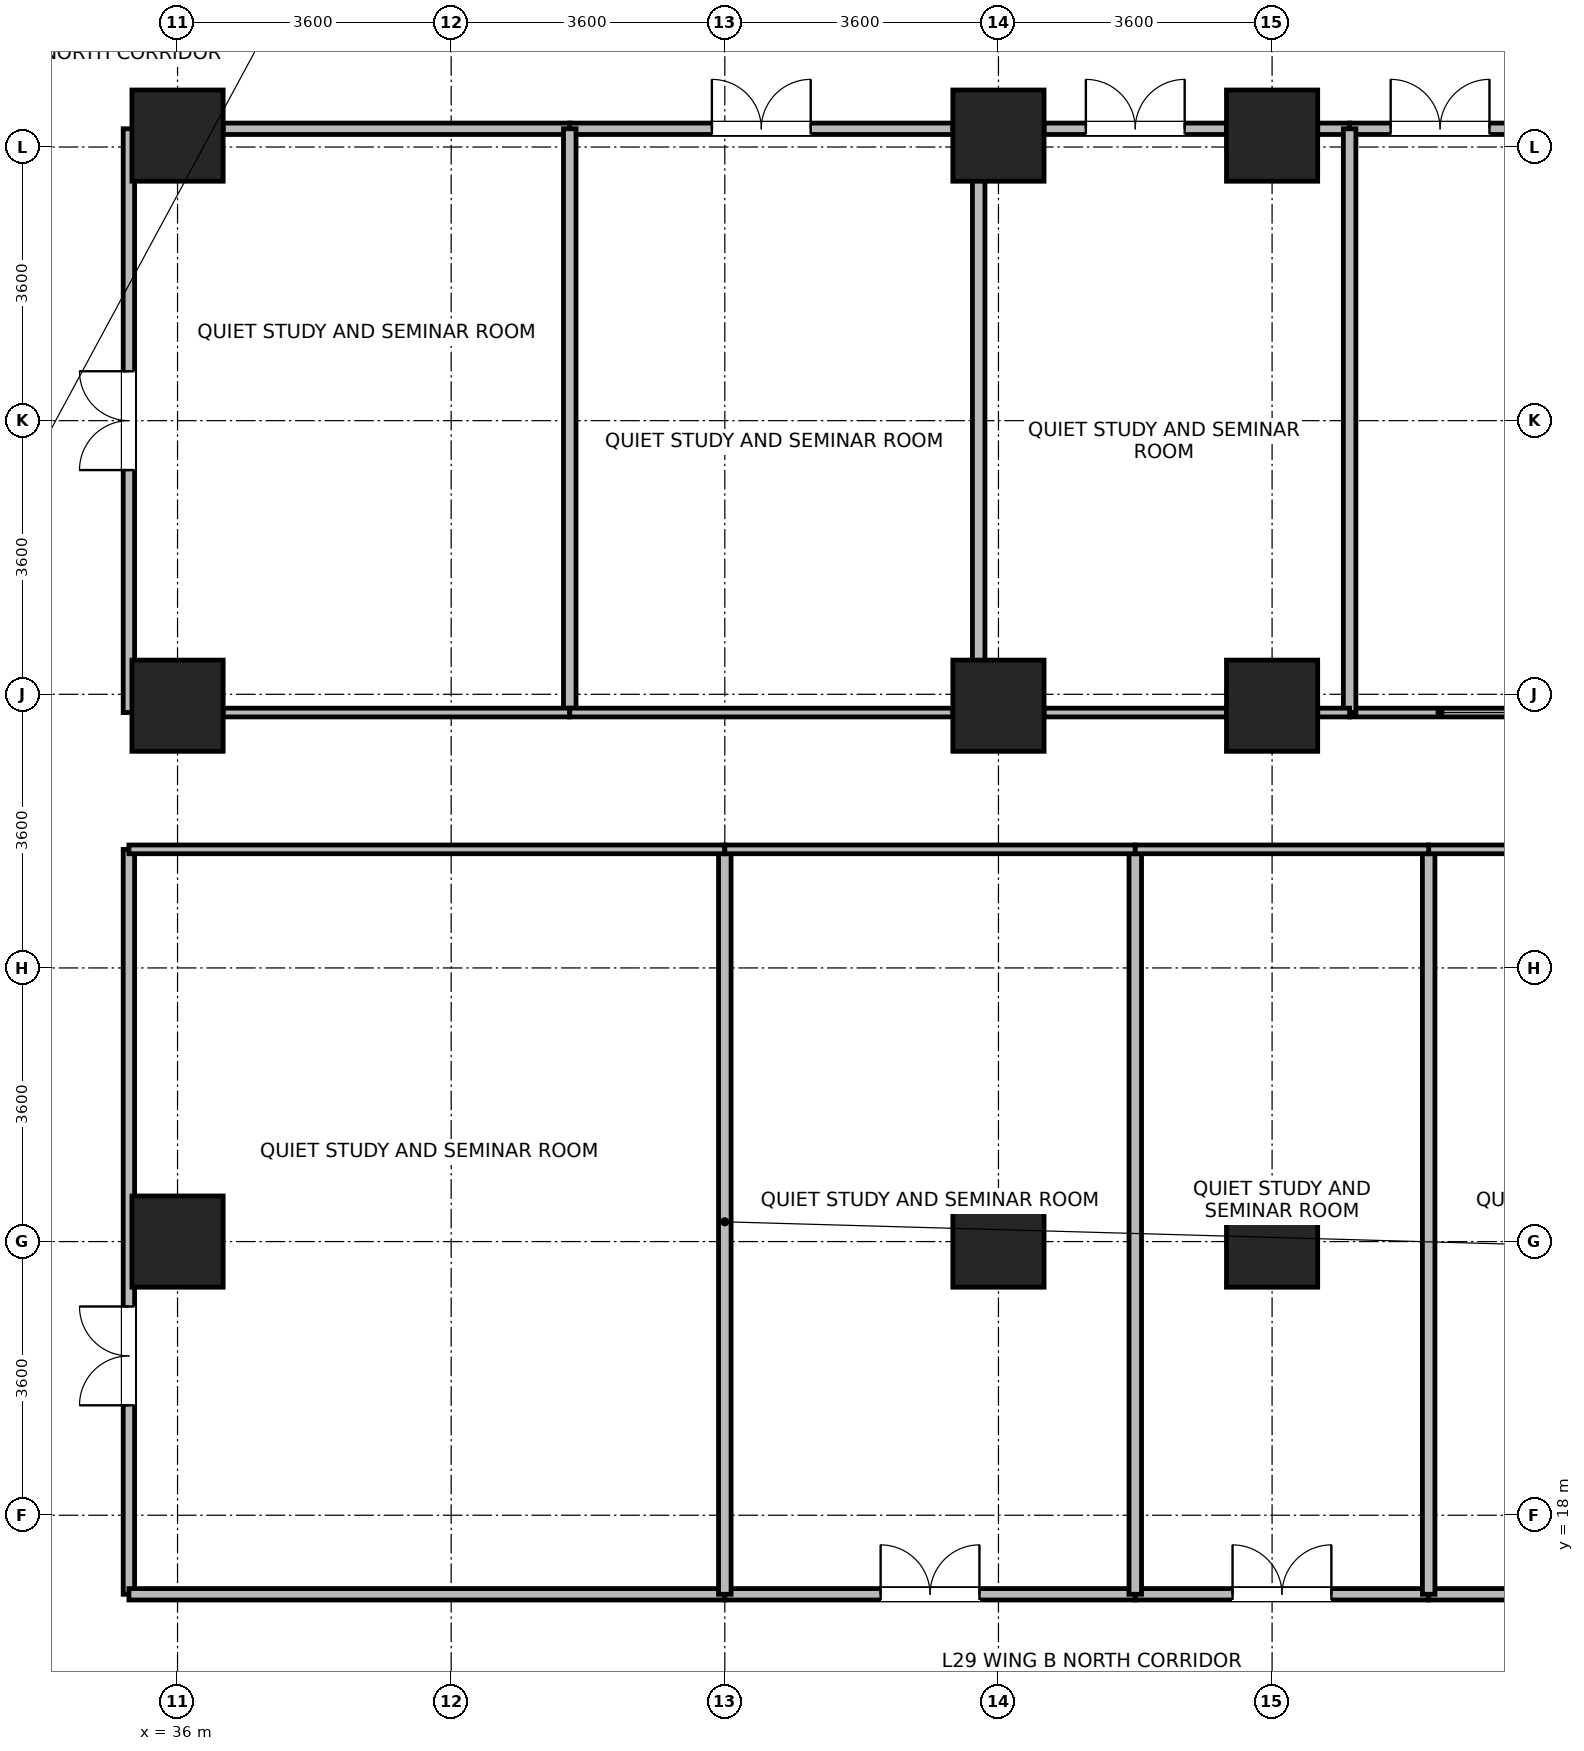
"""IFC4 building model, lengths in metres.
Left out: names, types, materials, properties, quantities, classifications, styles, units other than length and angle.
Written with IfcOpenShell. Run it as: python <this file> out.ifc"""

import sys

from ifc_helpers import new_model, si_unit, direction, frame, frame_2d, origin, origin_2d, place, context, subcontext, project, spatial, rectangle, extrude, source, transform, mapped, element, fill, save


model = new_model("IFC4")
c1 = context("Model", 3, precision=1e-05, world=origin(), true_north=direction((0.0, 1.0)))
c2 = subcontext(c1, "Body", "Model", "MODEL_VIEW")
j1 = project(units=[si_unit("LENGTHUNIT", "METRE"), si_unit("PLANEANGLEUNIT", "RADIAN")], contexts=[c1])
p1 = place(None, origin())
s1 = spatial("IfcSite", under=j1, at=p1, CompositionType="ELEMENT")
p2 = place(p1, origin())
s2 = spatial("IfcBuilding", under=s1, at=p2, CompositionType="ELEMENT")
p3 = place(p2, frame((0.0, 0.0, 115.6)))
s3 = spatial("IfcBuildingStorey", under=s2, at=p3, CompositionType="ELEMENT", Elevation=115.6)
m1 = source(origin(), c2, "Body", "SweptSolid", [
    extrude(rectangle(XDim=1.2, YDim=1.2, at=origin_2d()), origin(), (0.0, 0.0, 1.0), 3.7),
])
for number, where, z_axis, x_axis in (
    (1, (36.0, 21.6, 0.0), (0.0, 0.0, 1.0), (1.0, 0.0, 0.0)),
    (2, (36.0, 28.65, 0.0), (0.0, 0.0, 1.0), (1.0, 0.0, 0.0)),
    (3, (36.0, 36.15, 0.0), (0.0, 0.0, 1.0), (1.0, 0.0, 0.0)),
    (4, (46.8, 21.6, 0.0), (0.0, 0.0, 1.0), (1.0, 0.0, 0.0)),
    (5, (46.8, 28.65, 0.0), (0.0, 0.0, 1.0), (1.0, 0.0, 0.0)),
    (6, (46.8, 36.15, 0.0), (0.0, 0.0, 1.0), (1.0, 0.0, 0.0)),
    (7, (50.4, 21.6, 0.0), (0.0, 0.0, 1.0), (1.0, 0.0, 0.0)),
    (8, (50.4, 28.65, 0.0), (0.0, 0.0, 1.0), (1.0, 0.0, 0.0)),
    (9, (50.4, 36.15, 0.0), (0.0, 0.0, 1.0), (1.0, 0.0, 0.0)),
):
    element("IfcColumn", number, at=place(p3, frame(where, z_axis=z_axis, x_axis=x_axis)), inside=s3, PredefinedType="COLUMN", context=c2, shape_type="MappedRepresentation", body=[
        mapped(m1, transform((0.0, 0.0, 0.0), x_axis=(1.0, 0.0, 0.0), y_axis=(0.0, 1.0, 0.0), z_axis=(0.0, 0.0, 1.0), scale=1.0)),
    ])
p4 = place(p3, frame((35.36, 16.96, 0.0), z_axis=(0.0, 0.0, 1.0), x_axis=(0.0, 1.0, 0.0)))
e10 = element("IfcWall", 10, at=p4, inside=s3, PredefinedType="PARTITIONING", context=c2, shape_type="SweptSolid", body=[
    extrude(rectangle(XDim=9.8, YDim=0.15, at=frame_2d((4.9, 0.0))), origin(), (0.0, 0.0, 1.0), 3.43),
])
p5 = place(p4, frame((2.486, 0.0, 0.0)))
e11 = element("IfcOpeningElement", 11, at=p5, cuts=e10, PredefinedType="OPENING", context=c2, shape_type="SweptSolid", body=[
    extrude(rectangle(XDim=1.3, YDim=2.12, at=frame_2d((0.65, 1.06))), frame((0.0, 0.085, 0.0), z_axis=(0.0, -1.0, 0.0), x_axis=(1.0, 0.0, 0.0)), (0.0, 0.0, 1.0), 0.17),
])
p6 = place(p3, frame((51.42, 36.24, 0.0), z_axis=(0.0, 0.0, 1.0), x_axis=(1.0, 0.0, 0.0)))
e12 = element("IfcWall", 12, at=p6, inside=s3, PredefinedType="PARTITIONING", context=c2, shape_type="SweptSolid", body=[
    extrude(rectangle(XDim=2.38, YDim=0.15, at=frame_2d((1.19, 0.0))), origin(), (0.0, 0.0, 1.0), 2.78),
])
p7 = place(p6, frame((0.54, 0.0, 0.0)))
e13 = element("IfcOpeningElement", 13, at=p7, cuts=e12, PredefinedType="OPENING", context=c2, shape_type="SweptSolid", body=[
    extrude(rectangle(XDim=1.3, YDim=2.12, at=frame_2d((0.65, 1.06))), frame((0.0, 0.085, 0.0), z_axis=(0.0, -1.0, 0.0), x_axis=(1.0, 0.0, 0.0)), (0.0, 0.0, 1.0), 0.17),
])
p8 = place(p3, frame((35.36, 16.96, 0.0), z_axis=(0.0, 0.0, 1.0), x_axis=(1.0, 0.0, 0.0)))
e14 = element("IfcWall", 14, at=p8, inside=s3, PredefinedType="PARTITIONING", context=c2, shape_type="SweptSolid", body=[
    extrude(rectangle(XDim=7.84, YDim=0.15, at=frame_2d((3.92, 0.0))), origin(), (0.0, 0.0, 1.0), 3.43),
])
p9 = place(p3, frame((35.36, 28.56, 0.0), z_axis=(0.0, 0.0, 1.0), x_axis=(0.0, 1.0, 0.0)))
e15 = element("IfcWall", 15, at=p9, inside=s3, PredefinedType="PARTITIONING", context=c2, shape_type="SweptSolid", body=[
    extrude(rectangle(XDim=7.68, YDim=0.15, at=frame_2d((3.84, 0.0))), origin(), (0.0, 0.0, 1.0), 3.43),
])
p10 = place(p9, frame((3.19, 0.0, 0.0)))
e16 = element("IfcOpeningElement", 16, at=p10, cuts=e15, PredefinedType="OPENING", context=c2, shape_type="SweptSolid", body=[
    extrude(rectangle(XDim=1.3, YDim=2.12, at=frame_2d((0.65, 1.06))), frame((0.0, 0.085, 0.0), z_axis=(0.0, -1.0, 0.0), x_axis=(1.0, 0.0, 0.0)), (0.0, 0.0, 1.0), 0.17),
])
p11 = place(p3, frame((36.6, 36.24, 0.0), z_axis=(0.0, 0.0, 1.0), x_axis=(1.0, 0.0, 0.0)))
e17 = element("IfcWall", 17, at=p11, inside=s3, PredefinedType="PARTITIONING", context=c2, shape_type="SweptSolid", body=[
    extrude(rectangle(XDim=4.56, YDim=0.15, at=frame_2d((2.28, 0.0))), origin(), (0.0, 0.0, 1.0), 2.78),
])
p12 = place(p3, frame((52.46, 16.96, 0.0), z_axis=(0.0, 0.0, 1.0), x_axis=(1.0, 0.0, 0.0)))
e18 = element("IfcWall", 18, at=p12, inside=s3, PredefinedType="PARTITIONING", context=c2, shape_type="SweptSolid", body=[
    extrude(rectangle(XDim=5.7, YDim=0.15, at=frame_2d((2.85, 0.0))), origin(), (0.0, 0.0, 1.0), 3.43),
])
p13 = place(p12, frame((2.2, 0.0, 0.0)))
e19 = element("IfcOpeningElement", 19, at=p13, cuts=e18, PredefinedType="OPENING", context=c2, shape_type="SweptSolid", body=[
    extrude(rectangle(XDim=1.3, YDim=2.12, at=frame_2d((0.65, 1.06))), frame((0.0, 0.085, 0.0), z_axis=(0.0, -1.0, 0.0), x_axis=(1.0, 0.0, 0.0)), (0.0, 0.0, 1.0), 0.17),
])
p14 = place(p3, frame((43.2, 16.96, 0.0), z_axis=(0.0, 0.0, 1.0), x_axis=(1.0, 0.0, 0.0)))
e20 = element("IfcWall", 20, at=p14, inside=s3, PredefinedType="PARTITIONING", context=c2, shape_type="SweptSolid", body=[
    extrude(rectangle(XDim=5.4, YDim=0.15, at=frame_2d((2.7, 0.0))), origin(), (0.0, 0.0, 1.0), 3.43),
])
p15 = place(p14, frame((2.05, 0.0, 0.0)))
e21 = element("IfcOpeningElement", 21, at=p15, cuts=e20, PredefinedType="OPENING", context=c2, shape_type="SweptSolid", body=[
    extrude(rectangle(XDim=1.3, YDim=2.12, at=frame_2d((0.65, 1.06))), frame((0.0, 0.085, 0.0), z_axis=(0.0, -1.0, 0.0), x_axis=(1.0, 0.0, 0.0)), (0.0, 0.0, 1.0), 0.17),
])
p16 = place(p3, frame((41.16, 36.24, 0.0), z_axis=(0.0, 0.0, 1.0), x_axis=(1.0, 0.0, 0.0)))
e22 = element("IfcWall", 22, at=p16, inside=s3, PredefinedType="PARTITIONING", context=c2, shape_type="SweptSolid", body=[
    extrude(rectangle(XDim=5.04, YDim=0.15, at=frame_2d((2.52, 0.0))), origin(), (0.0, 0.0, 1.0), 2.78),
])
p17 = place(p16, frame((1.87, 0.0, 0.0)))
e23 = element("IfcOpeningElement", 23, at=p17, cuts=e22, PredefinedType="OPENING", context=c2, shape_type="SweptSolid", body=[
    extrude(rectangle(XDim=1.3, YDim=2.12, at=frame_2d((0.65, 1.06))), frame((0.0, 0.085, 0.0), z_axis=(0.0, -1.0, 0.0), x_axis=(1.0, 0.0, 0.0)), (0.0, 0.0, 1.0), 0.17),
])
p18 = place(p3, frame((47.4, 36.24, 0.0), z_axis=(0.0, 0.0, 1.0), x_axis=(1.0, 0.0, 0.0)))
e24 = element("IfcWall", 24, at=p18, inside=s3, PredefinedType="PARTITIONING", context=c2, shape_type="SweptSolid", body=[
    extrude(rectangle(XDim=2.4, YDim=0.15, at=frame_2d((1.2, 0.0))), origin(), (0.0, 0.0, 1.0), 2.78),
])
p19 = place(p18, frame((0.55, 0.0, 0.0)))
e25 = element("IfcOpeningElement", 25, at=p19, cuts=e24, PredefinedType="OPENING", context=c2, shape_type="SweptSolid", body=[
    extrude(rectangle(XDim=1.3, YDim=2.12, at=frame_2d((0.65, 1.06))), frame((0.0, 0.085, 0.0), z_axis=(0.0, -1.0, 0.0), x_axis=(1.0, 0.0, 0.0)), (0.0, 0.0, 1.0), 0.17),
])
p20 = place(p3, frame((51.0, 36.24, 0.0), z_axis=(0.0, 0.0, 1.0), x_axis=(1.0, 0.0, 0.0)))
e26 = element("IfcWall", 26, at=p20, inside=s3, PredefinedType="PARTITIONING", context=c2, shape_type="SweptSolid", body=[
    extrude(rectangle(XDim=0.42, YDim=0.15, at=frame_2d((0.21, 0.0))), origin(), (0.0, 0.0, 1.0), 2.78),
])
p21 = place(p3, frame((48.6, 16.96, 0.0), z_axis=(0.0, 0.0, 1.0), x_axis=(1.0, 0.0, 0.0)))
e27 = element("IfcWall", 27, at=p21, inside=s3, PredefinedType="PARTITIONING", context=c2, shape_type="SweptSolid", body=[
    extrude(rectangle(XDim=3.86, YDim=0.15, at=frame_2d((1.93, 0.0))), origin(), (0.0, 0.0, 1.0), 3.43),
])
p22 = place(p21, frame((1.28, 0.0, 0.0)))
e28 = element("IfcOpeningElement", 28, at=p22, cuts=e27, PredefinedType="OPENING", context=c2, shape_type="SweptSolid", body=[
    extrude(rectangle(XDim=1.3, YDim=2.12, at=frame_2d((0.65, 1.06))), frame((0.0, 0.085, 0.0), z_axis=(0.0, -1.0, 0.0), x_axis=(1.0, 0.0, 0.0)), (0.0, 0.0, 1.0), 0.17),
])
for number, where, z_axis, x_axis in (
    (29, (43.2, 16.96, 0.0), (0.0, 0.0, 1.0), (0.0, 1.0, 0.0)),
    (30, (48.6, 16.96, 0.0), (0.0, 0.0, 1.0), (0.0, 1.0, 0.0)),
    (31, (52.46, 16.96, 0.0), (0.0, 0.0, 1.0), (0.0, 1.0, 0.0)),
):
    element("IfcWall", number, at=place(p3, frame(where, z_axis=z_axis, x_axis=x_axis)), inside=s3, PredefinedType="PARTITIONING", context=c2, shape_type="SweptSolid", body=[
        extrude(rectangle(XDim=9.8, YDim=0.165, at=frame_2d((4.9, 0.0))), origin(), (0.0, 0.0, 1.0), 3.43),
    ])
p23 = place(p3, frame((51.42, 28.56, 0.0), z_axis=(0.0, 0.0, 1.0), x_axis=(1.0, 0.0, 0.0)))
e32 = element("IfcWall", 32, at=p23, inside=s3, PredefinedType="PARTITIONING", context=c2, shape_type="SweptSolid", body=[
    extrude(rectangle(XDim=2.38, YDim=0.115, at=frame_2d((1.19, 0.0))), origin(), (0.0, 0.0, 1.0), 2.78),
])
p24 = place(p3, frame((35.36, 26.76, 0.0), z_axis=(0.0, 0.0, 1.0), x_axis=(1.0, 0.0, 0.0)))
e33 = element("IfcWall", 33, at=p24, inside=s3, PredefinedType="PARTITIONING", context=c2, shape_type="SweptSolid", body=[
    extrude(rectangle(XDim=7.84, YDim=0.115, at=frame_2d((3.92, 0.0))), origin(), (0.0, 0.0, 1.0), 3.43),
])
for number, where, z_axis, x_axis in (
    (34, (41.16, 28.56, 0.0), (0.0, 0.0, 1.0), (0.0, 1.0, 0.0)),
    (35, (46.54, 28.56, 0.0), (0.0, 0.0, 1.0), (0.0, 1.0, 0.0)),
    (36, (51.42, 28.56, 0.0), (0.0, 0.0, 1.0), (0.0, 1.0, 0.0)),
):
    element("IfcWall", number, at=place(p3, frame(where, z_axis=z_axis, x_axis=x_axis)), inside=s3, PredefinedType="PARTITIONING", context=c2, shape_type="SweptSolid", body=[
        extrude(rectangle(XDim=7.68, YDim=0.165, at=frame_2d((3.84, 0.0))), origin(), (0.0, 0.0, 1.0), 3.43),
    ])
p25 = place(p3, frame((36.6, 28.56, 0.0), z_axis=(0.0, 0.0, 1.0), x_axis=(1.0, 0.0, 0.0)))
e37 = element("IfcWall", 37, at=p25, inside=s3, PredefinedType="PARTITIONING", context=c2, shape_type="SweptSolid", body=[
    extrude(rectangle(XDim=4.56, YDim=0.115, at=frame_2d((2.28, 0.0))), origin(), (0.0, 0.0, 1.0), 2.78),
])
p26 = place(p3, frame((52.46, 26.76, 0.0), z_axis=(0.0, 0.0, 1.0), x_axis=(1.0, 0.0, 0.0)))
e38 = element("IfcWall", 38, at=p26, inside=s3, PredefinedType="PARTITIONING", context=c2, shape_type="SweptSolid", body=[
    extrude(rectangle(XDim=5.7, YDim=0.115, at=frame_2d((2.85, 0.0))), origin(), (0.0, 0.0, 1.0), 3.43),
])
p27 = place(p3, frame((43.2, 26.76, 0.0), z_axis=(0.0, 0.0, 1.0), x_axis=(1.0, 0.0, 0.0)))
e39 = element("IfcWall", 39, at=p27, inside=s3, PredefinedType="PARTITIONING", context=c2, shape_type="SweptSolid", body=[
    extrude(rectangle(XDim=5.4, YDim=0.115, at=frame_2d((2.7, 0.0))), origin(), (0.0, 0.0, 1.0), 3.43),
])
p28 = place(p3, frame((41.16, 28.56, 0.0), z_axis=(0.0, 0.0, 1.0), x_axis=(1.0, 0.0, 0.0)))
e40 = element("IfcWall", 40, at=p28, inside=s3, PredefinedType="PARTITIONING", context=c2, shape_type="SweptSolid", body=[
    extrude(rectangle(XDim=5.04, YDim=0.115, at=frame_2d((2.52, 0.0))), origin(), (0.0, 0.0, 1.0), 2.78),
])
p29 = place(p3, frame((47.4, 28.56, 0.0), z_axis=(0.0, 0.0, 1.0), x_axis=(1.0, 0.0, 0.0)))
e41 = element("IfcWall", 41, at=p29, inside=s3, PredefinedType="PARTITIONING", context=c2, shape_type="SweptSolid", body=[
    extrude(rectangle(XDim=2.4, YDim=0.115, at=frame_2d((1.2, 0.0))), origin(), (0.0, 0.0, 1.0), 2.78),
])
p30 = place(p3, frame((51.0, 28.56, 0.0), z_axis=(0.0, 0.0, 1.0), x_axis=(1.0, 0.0, 0.0)))
e42 = element("IfcWall", 42, at=p30, inside=s3, PredefinedType="PARTITIONING", context=c2, shape_type="SweptSolid", body=[
    extrude(rectangle(XDim=0.42, YDim=0.115, at=frame_2d((0.21, 0.0))), origin(), (0.0, 0.0, 1.0), 2.78),
])
p31 = place(p3, frame((48.6, 26.76, 0.0), z_axis=(0.0, 0.0, 1.0), x_axis=(1.0, 0.0, 0.0)))
e43 = element("IfcWall", 43, at=p31, inside=s3, PredefinedType="PARTITIONING", context=c2, shape_type="SweptSolid", body=[
    extrude(rectangle(XDim=3.86, YDim=0.115, at=frame_2d((1.93, 0.0))), origin(), (0.0, 0.0, 1.0), 3.43),
])
p32 = place(p5, origin())
e44 = element("IfcDoor", 44, at=p32, inside=s3, OperationType="DOUBLE_DOOR_SINGLE_SWING", PredefinedType="DOOR", context=c2, shape_type="SweptSolid", body=[
    extrude(rectangle(XDim=1.3, YDim=2.12, at=frame_2d((0.65, 1.06))), frame((0.0, 0.025, 0.0), z_axis=(0.0, -1.0, 0.0), x_axis=(1.0, 0.0, 0.0)), (0.0, 0.0, 1.0), 0.05),
])
fill(e11, e44)
p33 = place(p7, origin())
e45 = element("IfcDoor", 45, at=p33, inside=s3, OperationType="DOUBLE_DOOR_SINGLE_SWING", PredefinedType="DOOR", context=c2, shape_type="SweptSolid", body=[
    extrude(rectangle(XDim=1.3, YDim=2.12, at=frame_2d((0.65, 1.06))), frame((0.0, 0.025, 0.0), z_axis=(0.0, -1.0, 0.0), x_axis=(1.0, 0.0, 0.0)), (0.0, 0.0, 1.0), 0.05),
])
fill(e13, e45)
p34 = place(p10, origin())
e46 = element("IfcDoor", 46, at=p34, inside=s3, OperationType="DOUBLE_DOOR_SINGLE_SWING", PredefinedType="DOOR", context=c2, shape_type="SweptSolid", body=[
    extrude(rectangle(XDim=1.3, YDim=2.12, at=frame_2d((0.65, 1.06))), frame((0.0, 0.025, 0.0), z_axis=(0.0, -1.0, 0.0), x_axis=(1.0, 0.0, 0.0)), (0.0, 0.0, 1.0), 0.05),
])
fill(e16, e46)
p35 = place(p15, origin())
e47 = element("IfcDoor", 47, at=p35, inside=s3, OperationType="DOUBLE_DOOR_SINGLE_SWING", PredefinedType="DOOR", context=c2, shape_type="SweptSolid", body=[
    extrude(rectangle(XDim=1.3, YDim=2.12, at=frame_2d((0.65, 1.06))), frame((0.0, 0.025, 0.0), z_axis=(0.0, -1.0, 0.0), x_axis=(1.0, 0.0, 0.0)), (0.0, 0.0, 1.0), 0.05),
])
fill(e21, e47)
p36 = place(p17, origin())
e48 = element("IfcDoor", 48, at=p36, inside=s3, OperationType="DOUBLE_DOOR_SINGLE_SWING", PredefinedType="DOOR", context=c2, shape_type="SweptSolid", body=[
    extrude(rectangle(XDim=1.3, YDim=2.12, at=frame_2d((0.65, 1.06))), frame((0.0, 0.025, 0.0), z_axis=(0.0, -1.0, 0.0), x_axis=(1.0, 0.0, 0.0)), (0.0, 0.0, 1.0), 0.05),
])
fill(e23, e48)
p37 = place(p19, origin())
e49 = element("IfcDoor", 49, at=p37, inside=s3, OperationType="DOUBLE_DOOR_SINGLE_SWING", PredefinedType="DOOR", context=c2, shape_type="SweptSolid", body=[
    extrude(rectangle(XDim=1.3, YDim=2.12, at=frame_2d((0.65, 1.06))), frame((0.0, 0.025, 0.0), z_axis=(0.0, -1.0, 0.0), x_axis=(1.0, 0.0, 0.0)), (0.0, 0.0, 1.0), 0.05),
])
fill(e25, e49)
p38 = place(p22, origin())
e50 = element("IfcDoor", 50, at=p38, inside=s3, OperationType="DOUBLE_DOOR_SINGLE_SWING", PredefinedType="DOOR", context=c2, shape_type="SweptSolid", body=[
    extrude(rectangle(XDim=1.3, YDim=2.12, at=frame_2d((0.65, 1.06))), frame((0.0, 0.025, 0.0), z_axis=(0.0, -1.0, 0.0), x_axis=(1.0, 0.0, 0.0)), (0.0, 0.0, 1.0), 0.05),
])
fill(e28, e50)
save(model, sys.argv[1])
